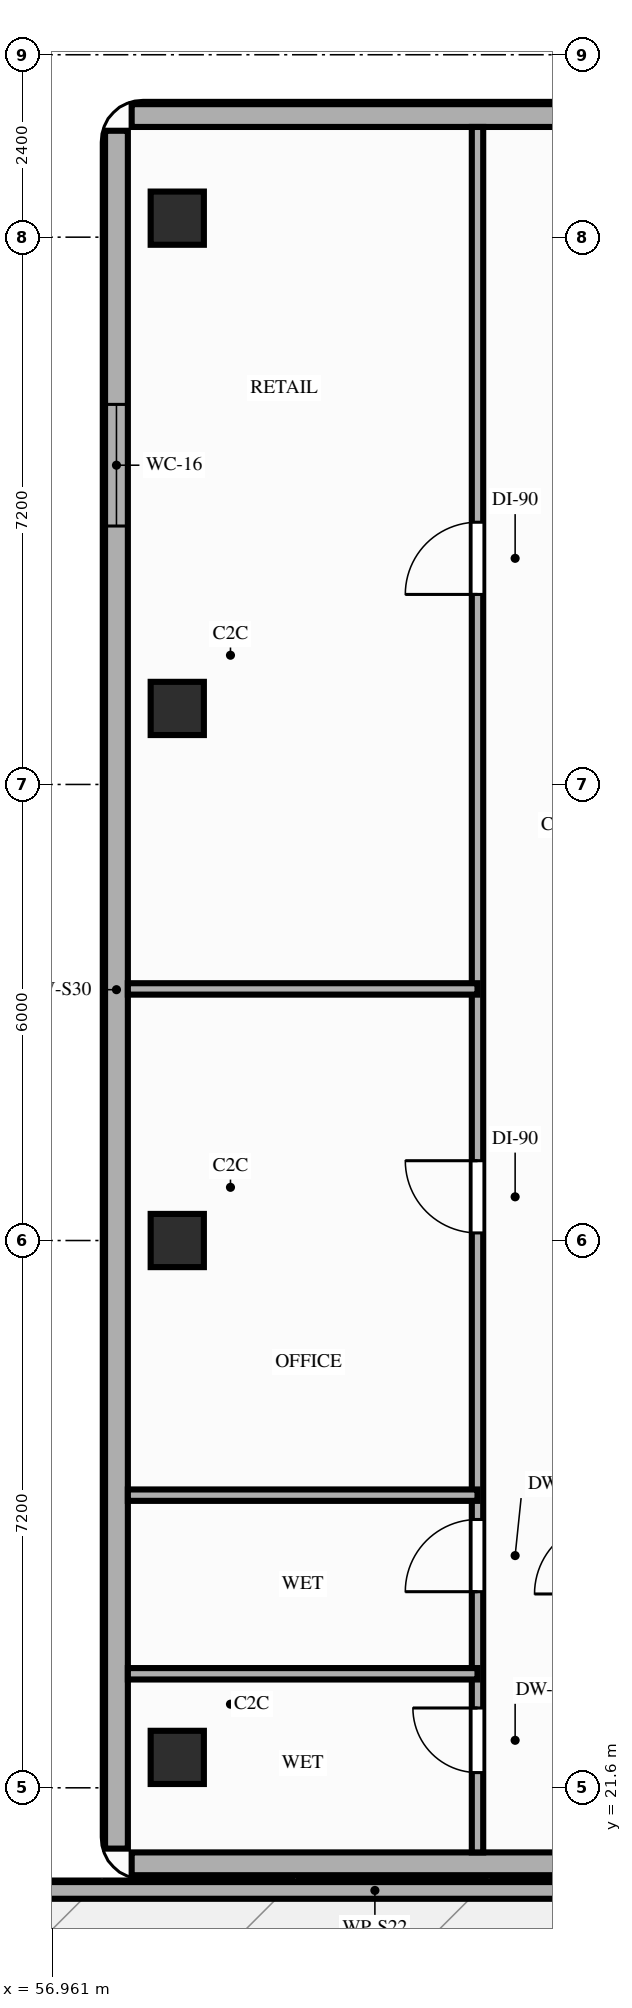
"""IFC4 building model, lengths in metres.
Left out: names, types, materials, properties, quantities, classifications, styles, units other than length and angle.
Written with IfcOpenShell. Run it as: python <this file> out.ifc"""

import sys

from ifc_helpers import new_model, si_unit, direction, frame, frame_2d, origin, origin_2d, place, context, subcontext, project, spatial, rectangle, extrude, element, fill, save


model = new_model("IFC4")
c1 = context("Model", 3, precision=1e-05, world=origin(), true_north=direction((0.0, 1.0)))
c2 = subcontext(c1, "Body", "Model", "MODEL_VIEW")
j1 = project(units=[si_unit("LENGTHUNIT", "METRE"), si_unit("PLANEANGLEUNIT", "RADIAN")], contexts=[c1])
p1 = place(None, origin())
s1 = spatial("IfcSite", under=j1, at=p1, CompositionType="ELEMENT")
p2 = place(p1, origin())
s2 = spatial("IfcBuilding", under=s1, at=p2, CompositionType="ELEMENT")
p3 = place(p2, frame((0.0, 0.0, 86.6)))
s3 = spatial("IfcBuildingStorey", under=s2, at=p3, CompositionType="ELEMENT", Elevation=86.6)
for number, where, z_axis, x_axis in (
    (1, (58.6, 22.0, 0.0), (0.0, 0.0, 1.0), (1.0, 0.0, 0.0)),
    (2, (58.6, 28.8, 0.0), (0.0, 0.0, 1.0), (1.0, 0.0, 0.0)),
    (3, (58.6, 35.8, 0.0), (0.0, 0.0, 1.0), (1.0, 0.0, 0.0)),
    (4, (58.6, 42.25, 0.0), (0.0, 0.0, 1.0), (1.0, 0.0, 0.0)),
):
    element("IfcColumn", number, at=place(p3, frame(where, z_axis=z_axis, x_axis=x_axis)), inside=s3, PredefinedType="COLUMN", context=c2, shape_type="SweptSolid", body=[
        extrude(rectangle(XDim=0.7, YDim=0.7, at=origin_2d()), origin(), (0.0, 0.0, 1.0), 3.2),
    ])
p4 = place(p3, frame((57.8, 43.4, 0.0), z_axis=(0.0, 0.0, 1.0), x_axis=(0.0, -1.0, 0.0)))
e5 = element("IfcWall", 5, at=p4, inside=s3, PredefinedType="STANDARD", context=c2, shape_type="SweptSolid", body=[
    extrude(rectangle(XDim=22.6, YDim=0.3, at=frame_2d((11.3, 0.0))), origin(), (0.0, 0.0, 1.0), 2.73),
])
p5 = place(p4, frame((3.6, 0.0, 0.85)))
e6 = element("IfcOpeningElement", 6, at=p5, cuts=e5, PredefinedType="OPENING", context=c2, shape_type="SweptSolid", body=[
    extrude(rectangle(XDim=1.6, YDim=1.58, at=frame_2d((0.8, 0.79))), frame((0.0, 0.16, 0.0), z_axis=(0.0, -1.0, 0.0), x_axis=(1.0, 0.0, 0.0)), (0.0, 0.0, 1.0), 0.32),
])
for number, where, z_axis, x_axis in (
    (7, (72.8, 43.6, 0.0), (0.0, 0.0, 1.0), (-1.0, 0.0, 0.0)),
    (8, (58.0, 20.6, 0.0), (0.0, 0.0, 1.0), (1.0, 0.0, 0.0)),
):
    element("IfcWall", number, at=place(p3, frame(where, z_axis=z_axis, x_axis=x_axis)), inside=s3, PredefinedType="STANDARD", context=c2, shape_type="SweptSolid", body=[
        extrude(rectangle(XDim=14.8, YDim=0.3, at=frame_2d((7.4, 0.0))), origin(), (0.0, 0.0, 1.0), 3.02),
    ])
p6 = place(p3, frame((67.05, 20.25, 0.0), z_axis=(0.0, 0.0, 1.0), x_axis=(-1.0, 0.0, 0.0)))
e9 = element("IfcWall", 9, at=p6, inside=s3, PredefinedType="PARAPET", context=c2, shape_type="SweptSolid", body=[
    extrude(rectangle(XDim=11.7, YDim=0.22, at=frame_2d((5.85, 0.0))), origin(), (0.0, 0.0, 1.0), 1.15),
])
p7 = place(p3, frame((62.55, 20.75, 0.0), z_axis=(0.0, 0.0, 1.0), x_axis=(0.0, 1.0, 0.0)))
e10 = element("IfcWall", 10, at=p7, inside=s3, PredefinedType="PARTITIONING", context=c2, shape_type="SweptSolid", body=[
    extrude(rectangle(XDim=22.7, YDim=0.15, at=frame_2d((11.35, 0.0))), origin(), (0.0, 0.0, 1.0), 2.6),
])
p8 = place(p7, frame((1.05, 0.0, 0.0)))
e11 = element("IfcOpeningElement", 11, at=p8, cuts=e10, PredefinedType="OPENING", context=c2, shape_type="SweptSolid", body=[
    extrude(rectangle(XDim=0.85, YDim=2.1, at=frame_2d((0.425, 1.05))), frame((0.0, 0.085, 0.0), z_axis=(0.0, -1.0, 0.0), x_axis=(1.0, 0.0, 0.0)), (0.0, 0.0, 1.0), 0.17),
])
p9 = place(p7, frame((3.43, 0.0, 0.0)))
e12 = element("IfcOpeningElement", 12, at=p9, cuts=e10, PredefinedType="OPENING", context=c2, shape_type="SweptSolid", body=[
    extrude(rectangle(XDim=0.95, YDim=2.1, at=frame_2d((0.475, 1.05))), frame((0.0, 0.085, 0.0), z_axis=(0.0, -1.0, 0.0), x_axis=(1.0, 0.0, 0.0)), (0.0, 0.0, 1.0), 0.17),
])
p10 = place(p7, frame((8.15, 0.0, 0.0)))
e13 = element("IfcOpeningElement", 13, at=p10, cuts=e10, PredefinedType="OPENING", context=c2, shape_type="SweptSolid", body=[
    extrude(rectangle(XDim=0.95, YDim=2.15, at=frame_2d((0.475, 1.075))), frame((0.0, 0.085, 0.0), z_axis=(0.0, -1.0, 0.0), x_axis=(1.0, 0.0, 0.0)), (0.0, 0.0, 1.0), 0.17),
])
p11 = place(p7, frame((16.55, 0.0, 0.0)))
e14 = element("IfcOpeningElement", 14, at=p11, cuts=e10, PredefinedType="OPENING", context=c2, shape_type="SweptSolid", body=[
    extrude(rectangle(XDim=0.95, YDim=2.15, at=frame_2d((0.475, 1.075))), frame((0.0, 0.085, 0.0), z_axis=(0.0, -1.0, 0.0), x_axis=(1.0, 0.0, 0.0)), (0.0, 0.0, 1.0), 0.17),
])
for number, where, z_axis, x_axis in (
    (15, (57.95, 23.1, 0.0), (0.0, 0.0, 1.0), (1.0, 0.0, 0.0)),
    (16, (57.95, 25.45, 0.0), (0.0, 0.0, 1.0), (1.0, 0.0, 0.0)),
    (17, (57.95, 32.11, 0.0), (0.0, 0.0, 1.0), (1.0, 0.0, 0.0)),
):
    element("IfcWall", number, at=place(p3, frame(where, z_axis=z_axis, x_axis=x_axis)), inside=s3, PredefinedType="PARTITIONING", context=c2, shape_type="SweptSolid", body=[
        extrude(rectangle(XDim=4.6, YDim=0.15, at=frame_2d((2.3, 0.0))), origin(), (0.0, 0.0, 1.0), 2.6),
    ])
p12 = place(p5, origin())
e18 = element("IfcWindow", 18, at=p12, inside=s3, PartitioningType="SINGLE_PANEL", PredefinedType="WINDOW", context=c2, shape_type="SweptSolid", body=[
    extrude(rectangle(XDim=1.6, YDim=1.58, at=frame_2d((0.8, 0.79))), frame((0.0, 0.03, 0.0), z_axis=(0.0, -1.0, 0.0), x_axis=(1.0, 0.0, 0.0)), (0.0, 0.0, 1.0), 0.06),
])
fill(e6, e18)
p13 = place(p8, origin())
e19 = element("IfcDoor", 19, at=p13, inside=s3, OperationType="SINGLE_SWING_RIGHT", PredefinedType="DOOR", context=c2, shape_type="SweptSolid", body=[
    extrude(rectangle(XDim=0.85, YDim=2.1, at=frame_2d((0.425, 1.05))), frame((0.0, 0.025, 0.0), z_axis=(0.0, -1.0, 0.0), x_axis=(1.0, 0.0, 0.0)), (0.0, 0.0, 1.0), 0.05),
])
fill(e11, e19)
p14 = place(p9, origin())
e20 = element("IfcDoor", 20, at=p14, inside=s3, OperationType="SINGLE_SWING_LEFT", PredefinedType="DOOR", context=c2, shape_type="SweptSolid", body=[
    extrude(rectangle(XDim=0.95, YDim=2.1, at=frame_2d((0.475, 1.05))), frame((0.0, 0.025, 0.0), z_axis=(0.0, -1.0, 0.0), x_axis=(1.0, 0.0, 0.0)), (0.0, 0.0, 1.0), 0.05),
])
fill(e12, e20)
p15 = place(p10, origin())
e21 = element("IfcDoor", 21, at=p15, inside=s3, OperationType="SINGLE_SWING_RIGHT", PredefinedType="DOOR", context=c2, shape_type="SweptSolid", body=[
    extrude(rectangle(XDim=0.95, YDim=2.15, at=frame_2d((0.475, 1.075))), frame((0.0, 0.025, 0.0), z_axis=(0.0, -1.0, 0.0), x_axis=(1.0, 0.0, 0.0)), (0.0, 0.0, 1.0), 0.05),
])
fill(e13, e21)
p16 = place(p11, origin())
e22 = element("IfcDoor", 22, at=p16, inside=s3, OperationType="SINGLE_SWING_LEFT", PredefinedType="DOOR", context=c2, shape_type="SweptSolid", body=[
    extrude(rectangle(XDim=0.95, YDim=2.15, at=frame_2d((0.475, 1.075))), frame((0.0, 0.025, 0.0), z_axis=(0.0, -1.0, 0.0), x_axis=(1.0, 0.0, 0.0)), (0.0, 0.0, 1.0), 0.05),
])
fill(e14, e22)
save(model, sys.argv[1])
